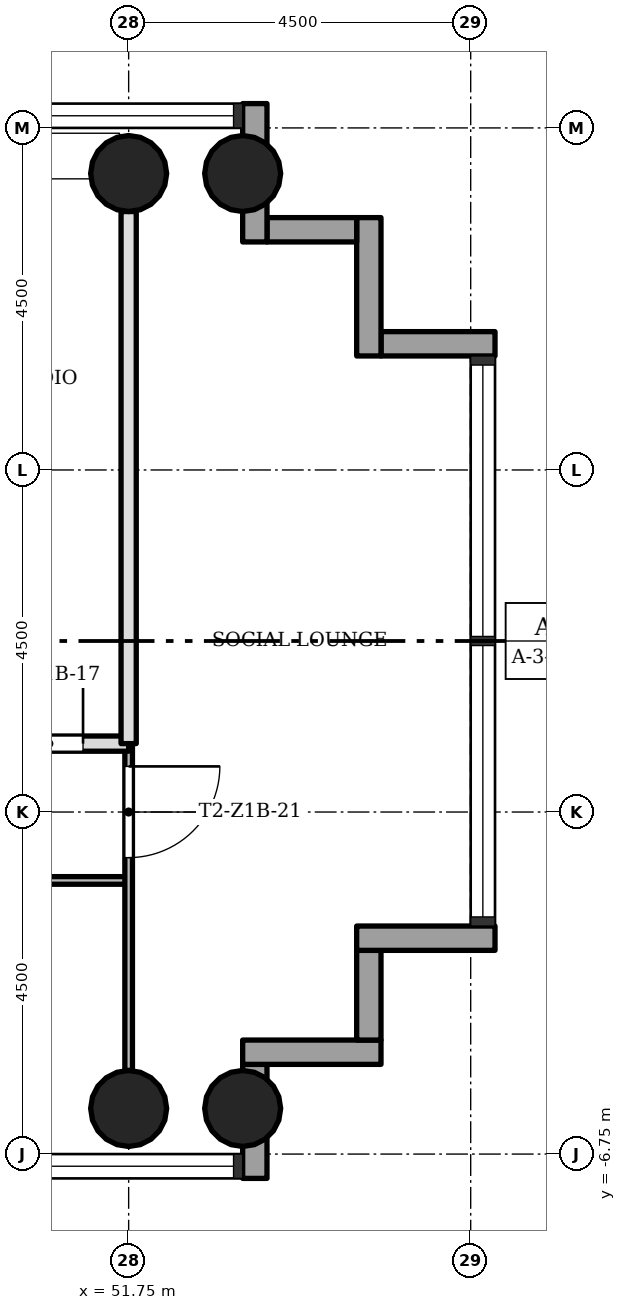
"""IFC4 building model, lengths in metres.
Left out: names, types, materials, properties, quantities, classifications, styles, units other than length and angle.
Written with IfcOpenShell. Run it as: python <this file> out.ifc"""

import sys

from ifc_helpers import new_model, si_unit, direction, frame, frame_2d, origin, origin_2d, place, context, subcontext, project, spatial, rectangle, hollow_circle, extrude, element, fill, save


model = new_model("IFC4")
c1 = context("Model", 3, precision=1e-05, world=origin(), true_north=direction((0.0, 1.0)))
c2 = subcontext(c1, "Body", "Model", "MODEL_VIEW")
j1 = project(units=[si_unit("LENGTHUNIT", "METRE"), si_unit("PLANEANGLEUNIT", "RADIAN")], contexts=[c1])
p1 = place(None, origin())
s1 = spatial("IfcSite", under=j1, at=p1, CompositionType="ELEMENT")
p2 = place(p1, origin())
s2 = spatial("IfcBuilding", under=s1, at=p2, CompositionType="ELEMENT")
p3 = place(p2, frame((0.0, 0.0, 41.5)))
s3 = spatial("IfcBuildingStorey", under=s2, at=p3, CompositionType="ELEMENT", Elevation=41.5)
for number, where, z_axis, x_axis in (
    (1, (51.75, -6.15, 0.0), (0.0, 0.0, 1.0), (1.0, 0.0, 0.0)),
    (2, (51.75, 6.15, 0.0), (0.0, 0.0, 1.0), (1.0, 0.0, 0.0)),
    (3, (53.25, -6.15, 0.0), (0.0, 0.0, 1.0), (1.0, 0.0, 0.0)),
    (4, (53.25, 6.15, 0.0), (0.0, 0.0, 1.0), (1.0, 0.0, 0.0)),
):
    element("IfcColumn", number, at=place(p3, frame(where, z_axis=z_axis, x_axis=x_axis)), inside=s3, PredefinedType="COLUMN", context=c2, shape_type="SweptSolid", body=[
        extrude(hollow_circle(Radius=0.5, WallThickness=0.036, at=origin_2d()), origin(), (0.0, 0.0, 1.0), 3.4),
    ])
p4 = place(p3, frame((53.41, -7.07, -0.3), z_axis=(0.0, 0.0, 1.0), x_axis=(0.0, 1.0, 0.0)))
e5 = element("IfcWall", 5, at=p4, inside=s3, PredefinedType="STANDARD", context=c2, shape_type="SweptSolid", body=[
    extrude(rectangle(XDim=1.5, YDim=0.32, at=frame_2d((0.75, 0.0))), origin(), (0.0, 0.0, 1.0), 3.4),
])
p5 = place(p3, frame((53.25, -5.41, -0.3), z_axis=(0.0, 0.0, 1.0), x_axis=(1.0, 0.0, 0.0)))
e6 = element("IfcWall", 6, at=p5, inside=s3, PredefinedType="STANDARD", context=c2, shape_type="SweptSolid", body=[
    extrude(rectangle(XDim=1.82, YDim=0.32, at=frame_2d((0.91, 0.0))), origin(), (0.0, 0.0, 1.0), 3.4),
])
p6 = place(p3, frame((54.91, -5.25, -0.3), z_axis=(0.0, 0.0, 1.0), x_axis=(0.0, 1.0, 0.0)))
e7 = element("IfcWall", 7, at=p6, inside=s3, PredefinedType="STANDARD", context=c2, shape_type="SweptSolid", body=[
    extrude(rectangle(XDim=1.18, YDim=0.32, at=frame_2d((0.59, 0.0))), origin(), (0.0, 0.0, 1.0), 3.4),
])
p7 = place(p3, frame((54.75, -3.91, -0.3), z_axis=(0.0, 0.0, 1.0), x_axis=(1.0, 0.0, 0.0)))
e8 = element("IfcWall", 8, at=p7, inside=s3, PredefinedType="STANDARD", context=c2, shape_type="SweptSolid", body=[
    extrude(rectangle(XDim=1.82, YDim=0.32, at=frame_2d((0.91, 0.0))), origin(), (0.0, 0.0, 1.0), 3.4),
])
p8 = place(p3, frame((56.57, 3.91, -0.3), z_axis=(0.0, 0.0, 1.0), x_axis=(-1.0, 0.0, 0.0)))
e9 = element("IfcWall", 9, at=p8, inside=s3, PredefinedType="STANDARD", context=c2, shape_type="SweptSolid", body=[
    extrude(rectangle(XDim=1.5, YDim=0.32, at=frame_2d((0.75, 0.0))), origin(), (0.0, 0.0, 1.0), 3.4),
])
p9 = place(p3, frame((54.91, 3.75, -0.3), z_axis=(0.0, 0.0, 1.0), x_axis=(0.0, 1.0, 0.0)))
e10 = element("IfcWall", 10, at=p9, inside=s3, PredefinedType="STANDARD", context=c2, shape_type="SweptSolid", body=[
    extrude(rectangle(XDim=1.82, YDim=0.32, at=frame_2d((0.91, 0.0))), origin(), (0.0, 0.0, 1.0), 3.4),
])
p10 = place(p3, frame((54.75, 5.41, -0.3), z_axis=(0.0, 0.0, 1.0), x_axis=(-1.0, 0.0, 0.0)))
e11 = element("IfcWall", 11, at=p10, inside=s3, PredefinedType="STANDARD", context=c2, shape_type="SweptSolid", body=[
    extrude(rectangle(XDim=1.18, YDim=0.32, at=frame_2d((0.59, 0.0))), origin(), (0.0, 0.0, 1.0), 3.4),
])
p11 = place(p3, frame((53.41, 5.25, -0.3), z_axis=(0.0, 0.0, 1.0), x_axis=(0.0, 1.0, 0.0)))
e12 = element("IfcWall", 12, at=p11, inside=s3, PredefinedType="STANDARD", context=c2, shape_type="SweptSolid", body=[
    extrude(rectangle(XDim=1.82, YDim=0.32, at=frame_2d((0.91, 0.0))), origin(), (0.0, 0.0, 1.0), 3.4),
])
p12 = place(p3, frame((51.75, -3.15, 0.0), z_axis=(0.0, 0.0, 1.0), x_axis=(-1.0, 0.0, 0.0)))
e13 = element("IfcWall", 13, at=p12, inside=s3, PredefinedType="PARTITIONING", context=c2, shape_type="SweptSolid", body=[
    extrude(rectangle(XDim=9.0, YDim=0.1, at=frame_2d((4.5, 0.0))), origin(), (0.0, 0.0, 1.0), 3.0),
])
p13 = place(p12, frame((6.3, 0.0, 0.0)))
e14 = element("IfcOpeningElement", 14, at=p13, cuts=e13, PredefinedType="OPENING", context=c2, shape_type="SweptSolid", body=[
    extrude(rectangle(XDim=0.9, YDim=2.1, at=frame_2d((0.45, 1.05))), frame((0.0, 0.06, 0.0), z_axis=(0.0, -1.0, 0.0), x_axis=(1.0, 0.0, 0.0)), (0.0, 0.0, 1.0), 0.12),
])
p14 = place(p12, frame((1.8, 0.0, 0.0)))
e15 = element("IfcOpeningElement", 15, at=p14, cuts=e13, PredefinedType="OPENING", context=c2, shape_type="SweptSolid", body=[
    extrude(rectangle(XDim=0.9, YDim=2.1, at=frame_2d((0.45, 1.05))), frame((0.0, 0.06, 0.0), z_axis=(0.0, -1.0, 0.0), x_axis=(1.0, 0.0, 0.0)), (0.0, 0.0, 1.0), 0.12),
])
p15 = place(p3, frame((51.75, -1.35, 0.0), z_axis=(0.0, 0.0, 1.0), x_axis=(-1.0, 0.0, 0.0)))
e16 = element("IfcWall", 16, at=p15, inside=s3, PredefinedType="SOLIDWALL", context=c2, shape_type="SweptSolid", body=[
    extrude(rectangle(XDim=4.5, YDim=0.2, at=frame_2d((2.25, 0.0))), origin(), (0.0, 0.0, 1.0), 3.0),
])
p16 = place(p15, frame((0.6, 0.0, 0.0)))
e17 = element("IfcOpeningElement", 17, at=p16, cuts=e16, PredefinedType="OPENING", context=c2, shape_type="SweptSolid", body=[
    extrude(rectangle(XDim=0.9, YDim=2.1, at=frame_2d((0.45, 1.05))), frame((0.0, 0.11, 0.0), z_axis=(0.0, -1.0, 0.0), x_axis=(1.0, 0.0, 0.0)), (0.0, 0.0, 1.0), 0.22),
])
p17 = place(p3, frame((51.75, -5.65, 0.0), z_axis=(0.0, 0.0, 1.0), x_axis=(0.0, 1.0, 0.0)))
e18 = element("IfcWall", 18, at=p17, inside=s3, PredefinedType="PARTITIONING", context=c2, shape_type="SweptSolid", body=[
    extrude(rectangle(XDim=4.3, YDim=0.1, at=frame_2d((2.15, 0.0))), origin(), (0.0, 0.0, 1.0), 3.0),
])
p18 = place(p17, frame((2.8, 0.0, 0.0)))
e19 = element("IfcOpeningElement", 19, at=p18, cuts=e18, PredefinedType="OPENING", context=c2, shape_type="SweptSolid", body=[
    extrude(rectangle(XDim=1.2, YDim=2.1, at=frame_2d((0.6, 1.05))), frame((0.0, 0.06, 0.0), z_axis=(0.0, -1.0, 0.0), x_axis=(1.0, 0.0, 0.0)), (0.0, 0.0, 1.0), 0.12),
])
p19 = place(p3, frame((51.75, -1.35, 0.0), z_axis=(0.0, 0.0, 1.0), x_axis=(0.0, 1.0, 0.0)))
e20 = element("IfcWall", 20, at=p19, inside=s3, PredefinedType="SOLIDWALL", context=c2, shape_type="SweptSolid", body=[
    extrude(rectangle(XDim=7.0, YDim=0.2, at=frame_2d((3.5, 0.0))), origin(), (0.0, 0.0, 1.0), 3.0),
])
p20 = place(p16, origin())
e21 = element("IfcDoor", 21, at=p20, inside=s3, OperationType="SINGLE_SWING_LEFT", PredefinedType="DOOR", context=c2, shape_type="SweptSolid", body=[
    extrude(rectangle(XDim=0.9, YDim=2.1, at=frame_2d((0.45, 1.05))), frame((0.0, 0.025, 0.0), z_axis=(0.0, -1.0, 0.0), x_axis=(1.0, 0.0, 0.0)), (0.0, 0.0, 1.0), 0.05),
])
fill(e17, e21)
p21 = place(p18, origin())
e22 = element("IfcDoor", 22, at=p21, inside=s3, OperationType="SINGLE_SWING_RIGHT", PredefinedType="DOOR", context=c2, shape_type="SweptSolid", body=[
    extrude(rectangle(XDim=1.2, YDim=2.1, at=frame_2d((0.6, 1.05))), frame((0.0, 0.025, 0.0), z_axis=(0.0, -1.0, 0.0), x_axis=(1.0, 0.0, 0.0)), (0.0, 0.0, 1.0), 0.05),
])
fill(e19, e22)
save(model, sys.argv[1])
